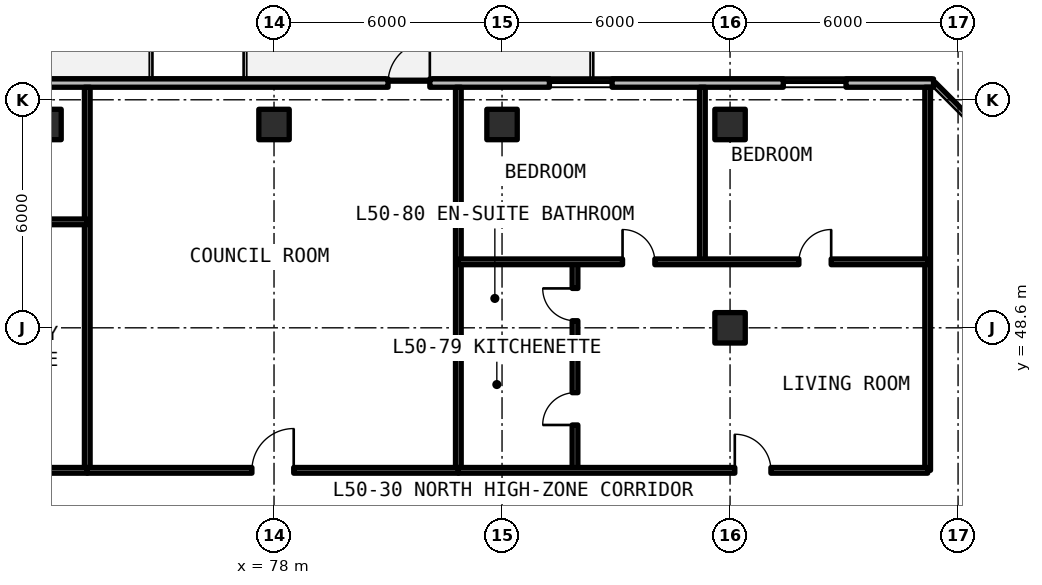
"""IFC4 building model, lengths in metres.
Left out: names, types, materials, properties, quantities, classifications, styles, units other than length and angle.
Written with IfcOpenShell. Run it as: python <this file> out.ifc"""

import sys

from ifc_helpers import new_model, si_unit, direction, frame, frame_2d, origin, origin_2d, place, context, subcontext, project, spatial, rectangle, extrude, element, fill, save


model = new_model("IFC4")
c1 = context("Model", 3, precision=1e-05, world=origin(), true_north=direction((0.0, 1.0)))
c2 = subcontext(c1, "Body", "Model", "MODEL_VIEW")
j1 = project(units=[si_unit("LENGTHUNIT", "METRE"), si_unit("PLANEANGLEUNIT", "RADIAN")], contexts=[c1])
p1 = place(None, origin())
s1 = spatial("IfcSite", under=j1, at=p1, CompositionType="ELEMENT")
p2 = place(p1, origin())
s2 = spatial("IfcBuilding", under=s1, at=p2, CompositionType="ELEMENT")
p3 = place(p2, frame((0.0, 0.0, 181.83)))
s3 = spatial("IfcBuildingStorey", under=s2, at=p3, CompositionType="ELEMENT", Elevation=181.83)
for number, where, z_axis, x_axis in (
    (1, (90.0, 48.6, 0.0), (0.0, 0.0, 1.0), (1.0, 0.0, 0.0)),
    (2, (72.0, 53.95, 0.0), (0.0, 0.0, 1.0), (1.0, 0.0, 0.0)),
    (3, (78.0, 53.95, 0.0), (0.0, 0.0, 1.0), (1.0, 0.0, 0.0)),
    (4, (84.0, 53.95, 0.0), (0.0, 0.0, 1.0), (1.0, 0.0, 0.0)),
    (5, (90.0, 53.95, 0.0), (0.0, 0.0, 1.0), (1.0, 0.0, 0.0)),
):
    element("IfcColumn", number, at=place(p3, frame(where, z_axis=z_axis, x_axis=x_axis)), inside=s3, PredefinedType="COLUMN", context=c2, shape_type="SweptSolid", body=[
        extrude(rectangle(XDim=0.8, YDim=0.8, at=origin_2d()), origin(), (0.0, 0.0, 1.0), 3.3),
    ])
p4 = place(p3, frame((95.354, 55.04, 0.0), z_axis=(0.0, 0.0, 1.0), x_axis=(-1.0, 0.0, 0.0)))
e6 = element("IfcWall", 6, at=p4, inside=s3, PredefinedType="SOLIDWALL", context=c2, shape_type="SweptSolid", body=[
    extrude(rectangle(XDim=43.244, YDim=0.22, at=frame_2d((21.622, 0.0))), origin(), (0.0, 0.0, 1.0), 3.08),
])
p5 = place(p4, frame((37.204, 0.0, 0.0)))
e7 = element("IfcOpeningElement", 7, at=p5, cuts=e6, PredefinedType="OPENING", context=c2, shape_type="SweptSolid", body=[
    extrude(rectangle(XDim=1.1, YDim=2.15, at=frame_2d((0.55, 1.075))), frame((0.0, 0.12, 0.0), z_axis=(0.0, -1.0, 0.0), x_axis=(1.0, 0.0, 0.0)), (0.0, 0.0, 1.0), 0.24),
])
p6 = place(p4, frame((25.104, 0.0, 0.0)))
e8 = element("IfcOpeningElement", 8, at=p6, cuts=e6, PredefinedType="OPENING", context=c2, shape_type="SweptSolid", body=[
    extrude(rectangle(XDim=1.1, YDim=2.15, at=frame_2d((0.55, 1.075))), frame((0.0, 0.12, 0.0), z_axis=(0.0, -1.0, 0.0), x_axis=(1.0, 0.0, 0.0)), (0.0, 0.0, 1.0), 0.24),
])
p7 = place(p4, frame((13.254, 0.0, 0.0)))
e9 = element("IfcOpeningElement", 9, at=p7, cuts=e6, PredefinedType="OPENING", context=c2, shape_type="SweptSolid", body=[
    extrude(rectangle(XDim=1.1, YDim=2.15, at=frame_2d((0.55, 1.075))), frame((0.0, 0.12, 0.0), z_axis=(0.0, -1.0, 0.0), x_axis=(1.0, 0.0, 0.0)), (0.0, 0.0, 1.0), 0.24),
])
p8 = place(p4, frame((32.815, 0.0, 0.78)))
e10 = element("IfcOpeningElement", 10, at=p8, cuts=e6, PredefinedType="OPENING", context=c2, shape_type="SweptSolid", body=[
    extrude(rectangle(XDim=1.65, YDim=1.66, at=frame_2d((0.825, 0.83))), frame((0.0, 0.12, 0.0), z_axis=(0.0, -1.0, 0.0), x_axis=(1.0, 0.0, 0.0)), (0.0, 0.0, 1.0), 0.24),
])
p9 = place(p4, frame((8.458, 0.0, 0.78)))
e11 = element("IfcOpeningElement", 11, at=p9, cuts=e6, PredefinedType="OPENING", context=c2, shape_type="SweptSolid", body=[
    extrude(rectangle(XDim=1.65, YDim=1.66, at=frame_2d((0.825, 0.83))), frame((0.0, 0.12, 0.0), z_axis=(0.0, -1.0, 0.0), x_axis=(1.0, 0.0, 0.0)), (0.0, 0.0, 1.0), 0.24),
])
p10 = place(p4, frame((2.303, 0.0, 0.78)))
e12 = element("IfcOpeningElement", 12, at=p10, cuts=e6, PredefinedType="OPENING", context=c2, shape_type="SweptSolid", body=[
    extrude(rectangle(XDim=1.65, YDim=1.66, at=frame_2d((0.825, 0.83))), frame((0.0, 0.12, 0.0), z_axis=(0.0, -1.0, 0.0), x_axis=(1.0, 0.0, 0.0)), (0.0, 0.0, 1.0), 0.24),
])
for number, where, z_axis, x_axis in (
    (13, (95.2, 44.85, 0.0), (0.0, 0.0, 1.0), (0.0, 1.0, 0.0)),
    (14, (73.086, 44.85, 0.0), (0.0, 0.0, 1.0), (0.0, 1.0, 0.0)),
):
    element("IfcWall", number, at=place(p3, frame(where, z_axis=z_axis, x_axis=x_axis)), inside=s3, PredefinedType="SOLIDWALL", context=c2, shape_type="SweptSolid", body=[
        extrude(rectangle(XDim=10.08, YDim=0.15, at=frame_2d((5.04, 0.0))), origin(), (0.0, 0.0, 1.0), 2.35),
    ])
p11 = place(p3, frame((64.757, 51.388, 0.0), z_axis=(0.0, 0.0, 1.0), x_axis=(1.0, 0.0, 0.0)))
e15 = element("IfcWall", 15, at=p11, inside=s3, PredefinedType="PARTITIONING", context=c2, shape_type="SweptSolid", body=[
    extrude(rectangle(XDim=8.329, YDim=0.15, at=frame_2d((4.165, 0.0))), origin(), (0.0, 0.0, 1.0), 2.35),
])
p12 = place(p11, frame((5.361, 0.0, 0.0)))
e16 = element("IfcOpeningElement", 16, at=p12, cuts=e15, PredefinedType="OPENING", context=c2, shape_type="SweptSolid", body=[
    extrude(rectangle(XDim=0.85, YDim=2.1, at=frame_2d((0.425, 1.05))), frame((0.0, 0.085, 0.0), z_axis=(0.0, -1.0, 0.0), x_axis=(1.0, 0.0, 0.0)), (0.0, 0.0, 1.0), 0.17),
])
p13 = place(p3, frame((64.757, 44.85, 0.0), z_axis=(0.0, 0.0, 1.0), x_axis=(1.0, 0.0, 0.0)))
e17 = element("IfcWall", 17, at=p13, inside=s3, PredefinedType="SOLIDWALL", context=c2, shape_type="SweptSolid", body=[
    extrude(rectangle(XDim=8.329, YDim=0.15, at=frame_2d((4.165, 0.0))), origin(), (0.0, 0.0, 1.0), 2.35),
])
p14 = place(p13, frame((5.311, 0.0, 0.0)))
e18 = element("IfcOpeningElement", 18, at=p14, cuts=e17, PredefinedType="OPENING", context=c2, shape_type="SweptSolid", body=[
    extrude(rectangle(XDim=0.95, YDim=2.15, at=frame_2d((0.475, 1.075))), frame((0.0, 0.085, 0.0), z_axis=(0.0, -1.0, 0.0), x_axis=(1.0, 0.0, 0.0)), (0.0, 0.0, 1.0), 0.17),
])
p15 = place(p3, frame((82.85, 44.85, 0.0), z_axis=(0.0, 0.0, 1.0), x_axis=(0.0, 1.0, 0.0)))
e19 = element("IfcWall", 19, at=p15, inside=s3, PredefinedType="SOLIDWALL", context=c2, shape_type="SweptSolid", body=[
    extrude(rectangle(XDim=10.08, YDim=0.15, at=frame_2d((5.04, 0.0))), origin(), (0.0, 0.0, 1.0), 2.35),
])
p16 = place(p3, frame((73.086, 44.85, 0.0), z_axis=(0.0, 0.0, 1.0), x_axis=(1.0, 0.0, 0.0)))
e20 = element("IfcWall", 20, at=p16, inside=s3, PredefinedType="SOLIDWALL", context=c2, shape_type="SweptSolid", body=[
    extrude(rectangle(XDim=9.765, YDim=0.15, at=frame_2d((4.882, 0.0))), origin(), (0.0, 0.0, 1.0), 2.35),
])
p17 = place(p16, frame((4.333, 0.0, 0.0)))
e21 = element("IfcOpeningElement", 21, at=p17, cuts=e20, PredefinedType="OPENING", context=c2, shape_type="SweptSolid", body=[
    extrude(rectangle(XDim=1.1, YDim=2.15, at=frame_2d((0.55, 1.075))), frame((0.0, 0.085, 0.0), z_axis=(0.0, -1.0, 0.0), x_axis=(1.0, 0.0, 0.0)), (0.0, 0.0, 1.0), 0.17),
])
p18 = place(p3, frame((82.85, 48.087, 0.0), z_axis=(0.0, 0.0, 1.0), x_axis=(1.0, 0.0, 0.0)))
e22 = element("IfcWall", 22, at=p18, inside=s3, PredefinedType="PARTITIONING", context=c2, shape_type="SweptSolid", body=[
    extrude(rectangle(XDim=3.07, YDim=0.15, at=frame_2d((1.535, 0.0))), origin(), (0.0, 0.0, 1.0), 2.35),
])
p19 = place(p3, frame((85.92, 44.85, 0.0), z_axis=(0.0, 0.0, 1.0), x_axis=(0.0, 1.0, 0.0)))
e23 = element("IfcWall", 23, at=p19, inside=s3, PredefinedType="PARTITIONING", context=c2, shape_type="SweptSolid", body=[
    extrude(rectangle(XDim=5.486, YDim=0.15, at=frame_2d((2.743, 0.0))), origin(), (0.0, 0.0, 1.0), 2.35),
])
p20 = place(p19, frame((1.193, 0.0, 0.0)))
e24 = element("IfcOpeningElement", 24, at=p20, cuts=e23, PredefinedType="OPENING", context=c2, shape_type="SweptSolid", body=[
    extrude(rectangle(XDim=0.85, YDim=2.1, at=frame_2d((0.425, 1.05))), frame((0.0, 0.085, 0.0), z_axis=(0.0, -1.0, 0.0), x_axis=(1.0, 0.0, 0.0)), (0.0, 0.0, 1.0), 0.17),
])
p21 = place(p19, frame((3.937, 0.0, 0.0)))
e25 = element("IfcOpeningElement", 25, at=p21, cuts=e23, PredefinedType="OPENING", context=c2, shape_type="SweptSolid", body=[
    extrude(rectangle(XDim=0.85, YDim=2.1, at=frame_2d((0.425, 1.05))), frame((0.0, 0.085, 0.0), z_axis=(0.0, -1.0, 0.0), x_axis=(1.0, 0.0, 0.0)), (0.0, 0.0, 1.0), 0.17),
])
p22 = place(p3, frame((89.272, 50.336, 0.0), z_axis=(0.0, 0.0, 1.0), x_axis=(0.0, 1.0, 0.0)))
e26 = element("IfcWall", 26, at=p22, inside=s3, PredefinedType="PARTITIONING", context=c2, shape_type="SweptSolid", body=[
    extrude(rectangle(XDim=4.594, YDim=0.15, at=frame_2d((2.297, 0.0))), origin(), (0.0, 0.0, 1.0), 2.35),
])
p23 = place(p3, frame((82.85, 50.336, 0.0), z_axis=(0.0, 0.0, 1.0), x_axis=(1.0, 0.0, 0.0)))
e27 = element("IfcWall", 27, at=p23, inside=s3, PredefinedType="PARTITIONING", context=c2, shape_type="SweptSolid", body=[
    extrude(rectangle(XDim=12.35, YDim=0.15, at=frame_2d((6.175, 0.0))), origin(), (0.0, 0.0, 1.0), 2.35),
])
p24 = place(p23, frame((4.321, 0.0, 0.0)))
e28 = element("IfcOpeningElement", 28, at=p24, cuts=e27, PredefinedType="OPENING", context=c2, shape_type="SweptSolid", body=[
    extrude(rectangle(XDim=0.85, YDim=2.1, at=frame_2d((0.425, 1.05))), frame((0.0, 0.085, 0.0), z_axis=(0.0, -1.0, 0.0), x_axis=(1.0, 0.0, 0.0)), (0.0, 0.0, 1.0), 0.17),
])
p25 = place(p23, frame((8.961, 0.0, 0.0)))
e29 = element("IfcOpeningElement", 29, at=p25, cuts=e27, PredefinedType="OPENING", context=c2, shape_type="SweptSolid", body=[
    extrude(rectangle(XDim=0.85, YDim=2.1, at=frame_2d((0.425, 1.05))), frame((0.0, 0.085, 0.0), z_axis=(0.0, -1.0, 0.0), x_axis=(1.0, 0.0, 0.0)), (0.0, 0.0, 1.0), 0.17),
])
p26 = place(p3, frame((82.85, 44.85, 0.0), z_axis=(0.0, 0.0, 1.0), x_axis=(1.0, 0.0, 0.0)))
e30 = element("IfcWall", 30, at=p26, inside=s3, PredefinedType="SOLIDWALL", context=c2, shape_type="SweptSolid", body=[
    extrude(rectangle(XDim=12.35, YDim=0.15, at=frame_2d((6.175, 0.0))), origin(), (0.0, 0.0, 1.0), 2.35),
])
p27 = place(p26, frame((7.275, 0.0, 0.0)))
e31 = element("IfcOpeningElement", 31, at=p27, cuts=e30, PredefinedType="OPENING", context=c2, shape_type="SweptSolid", body=[
    extrude(rectangle(XDim=0.95, YDim=2.15, at=frame_2d((0.475, 1.075))), frame((0.0, 0.085, 0.0), z_axis=(0.0, -1.0, 0.0), x_axis=(1.0, 0.0, 0.0)), (0.0, 0.0, 1.0), 0.17),
])
p28 = place(p7, frame((1.1, 0.0, 0.0), z_axis=(0.0, 0.0, 1.0), x_axis=(-1.0, 0.0, 0.0)))
e32 = element("IfcDoor", 32, at=p28, inside=s3, OperationType="SINGLE_SWING_RIGHT", PredefinedType="DOOR", context=c2, shape_type="SweptSolid", body=[
    extrude(rectangle(XDim=1.1, YDim=2.15, at=frame_2d((0.55, 1.075))), frame((0.0, 0.025, 0.0), z_axis=(0.0, -1.0, 0.0), x_axis=(1.0, 0.0, 0.0)), (0.0, 0.0, 1.0), 0.05),
])
fill(e9, e32)
p29 = place(p9, origin())
e33 = element("IfcWindow", 33, at=p29, inside=s3, PartitioningType="SINGLE_PANEL", PredefinedType="WINDOW", context=c2, shape_type="SweptSolid", body=[
    extrude(rectangle(XDim=1.65, YDim=1.66, at=frame_2d((0.825, 0.83))), frame((0.0, 0.03, 0.0), z_axis=(0.0, -1.0, 0.0), x_axis=(1.0, 0.0, 0.0)), (0.0, 0.0, 1.0), 0.06),
])
fill(e11, e33)
p30 = place(p10, origin())
e34 = element("IfcWindow", 34, at=p30, inside=s3, PartitioningType="SINGLE_PANEL", PredefinedType="WINDOW", context=c2, shape_type="SweptSolid", body=[
    extrude(rectangle(XDim=1.65, YDim=1.66, at=frame_2d((0.825, 0.83))), frame((0.0, 0.03, 0.0), z_axis=(0.0, -1.0, 0.0), x_axis=(1.0, 0.0, 0.0)), (0.0, 0.0, 1.0), 0.06),
])
fill(e12, e34)
p31 = place(p17, origin())
e35 = element("IfcDoor", 35, at=p31, inside=s3, OperationType="SINGLE_SWING_RIGHT", PredefinedType="DOOR", context=c2, shape_type="SweptSolid", body=[
    extrude(rectangle(XDim=1.1, YDim=2.15, at=frame_2d((0.55, 1.075))), frame((0.0, 0.025, 0.0), z_axis=(0.0, -1.0, 0.0), x_axis=(1.0, 0.0, 0.0)), (0.0, 0.0, 1.0), 0.05),
])
fill(e21, e35)
p32 = place(p20, origin())
e36 = element("IfcDoor", 36, at=p32, inside=s3, OperationType="SINGLE_SWING_LEFT", PredefinedType="DOOR", context=c2, shape_type="SweptSolid", body=[
    extrude(rectangle(XDim=0.85, YDim=2.1, at=frame_2d((0.425, 1.05))), frame((0.0, 0.025, 0.0), z_axis=(0.0, -1.0, 0.0), x_axis=(1.0, 0.0, 0.0)), (0.0, 0.0, 1.0), 0.05),
])
fill(e24, e36)
p33 = place(p21, origin())
e37 = element("IfcDoor", 37, at=p33, inside=s3, OperationType="SINGLE_SWING_RIGHT", PredefinedType="DOOR", context=c2, shape_type="SweptSolid", body=[
    extrude(rectangle(XDim=0.85, YDim=2.1, at=frame_2d((0.425, 1.05))), frame((0.0, 0.025, 0.0), z_axis=(0.0, -1.0, 0.0), x_axis=(1.0, 0.0, 0.0)), (0.0, 0.0, 1.0), 0.05),
])
fill(e25, e37)
p34 = place(p24, origin())
e38 = element("IfcDoor", 38, at=p34, inside=s3, OperationType="SINGLE_SWING_LEFT", PredefinedType="DOOR", context=c2, shape_type="SweptSolid", body=[
    extrude(rectangle(XDim=0.85, YDim=2.1, at=frame_2d((0.425, 1.05))), frame((0.0, 0.025, 0.0), z_axis=(0.0, -1.0, 0.0), x_axis=(1.0, 0.0, 0.0)), (0.0, 0.0, 1.0), 0.05),
])
fill(e28, e38)
p35 = place(p25, origin())
e39 = element("IfcDoor", 39, at=p35, inside=s3, OperationType="SINGLE_SWING_RIGHT", PredefinedType="DOOR", context=c2, shape_type="SweptSolid", body=[
    extrude(rectangle(XDim=0.85, YDim=2.1, at=frame_2d((0.425, 1.05))), frame((0.0, 0.025, 0.0), z_axis=(0.0, -1.0, 0.0), x_axis=(1.0, 0.0, 0.0)), (0.0, 0.0, 1.0), 0.05),
])
fill(e29, e39)
p36 = place(p27, origin())
e40 = element("IfcDoor", 40, at=p36, inside=s3, OperationType="SINGLE_SWING_LEFT", PredefinedType="DOOR", context=c2, shape_type="SweptSolid", body=[
    extrude(rectangle(XDim=0.95, YDim=2.15, at=frame_2d((0.475, 1.075))), frame((0.0, 0.025, 0.0), z_axis=(0.0, -1.0, 0.0), x_axis=(1.0, 0.0, 0.0)), (0.0, 0.0, 1.0), 0.05),
])
fill(e31, e40)
save(model, sys.argv[1])
